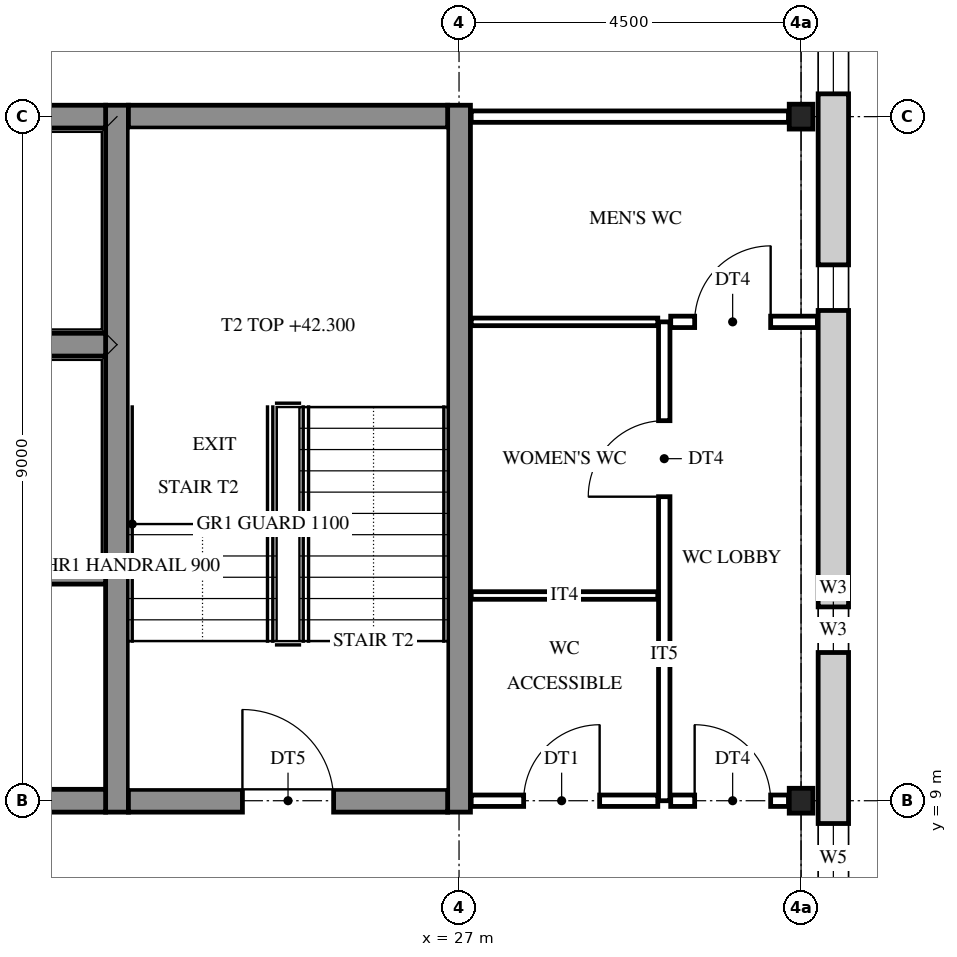
"""IFC4 building model, lengths in metres.
Left out: names, types, materials, properties, quantities, classifications, styles, units other than length and angle.
Written with IfcOpenShell. Run it as: python <this file> out.ifc"""

import sys

from ifc_helpers import new_model, si_unit, direction, frame, frame_2d, origin, origin_2d, place, context, subcontext, project, spatial, rectangle, i_section, extrude, element, fill, save


model = new_model("IFC4")
c1 = context("Model", 3, precision=1e-05, world=origin(), true_north=direction((0.0, 1.0)))
c2 = subcontext(c1, "Body", "Model", "MODEL_VIEW")
j1 = project(units=[si_unit("LENGTHUNIT", "METRE"), si_unit("PLANEANGLEUNIT", "RADIAN")], contexts=[c1])
p1 = place(None, origin())
s1 = spatial("IfcSite", under=j1, at=p1, CompositionType="ELEMENT")
p2 = place(p1, origin())
s2 = spatial("IfcBuilding", under=s1, at=p2, CompositionType="ELEMENT")
p3 = place(p2, frame((0.0, 0.0, 40.2)))
s3 = spatial("IfcBuildingStorey", under=s2, at=p3, CompositionType="ELEMENT", Elevation=40.2)
for number, where, z_axis, x_axis in (
    (1, (31.5, 9.0, 0.0), (0.0, 0.0, 1.0), (1.0, 0.0, 0.0)),
    (2, (31.5, 18.0, 0.0), (0.0, 0.0, 1.0), (1.0, 0.0, 0.0)),
):
    element("IfcColumn", number, at=place(p3, frame(where, z_axis=z_axis, x_axis=x_axis)), inside=s3, PredefinedType="COLUMN", context=c2, shape_type="SweptSolid", body=[
        extrude(i_section(OverallWidth=0.311, OverallDepth=0.327, WebThickness=0.016, FlangeThickness=0.025, FilletRadius=0.017, at=origin_2d()), origin(), (0.0, 0.0, 1.0), 4.2),
    ])
for number, where, z_axis, x_axis in (
    (3, (22.5, 8.85, 0.0), (0.0, 0.0, 1.0), (0.0, 1.0, 0.0)),
    (4, (27.0, 8.85, 0.0), (0.0, 0.0, 1.0), (0.0, 1.0, 0.0)),
):
    element("IfcWall", number, at=place(p3, frame(where, z_axis=z_axis, x_axis=x_axis)), inside=s3, PredefinedType="SHEAR", context=c2, shape_type="SweptSolid", body=[
        extrude(rectangle(XDim=9.3, YDim=0.3, at=frame_2d((4.65, 0.0))), origin(), (0.0, 0.0, 1.0), 4.2),
    ])
p4 = place(p3, frame((19.65, 9.0, 0.0), z_axis=(0.0, 0.0, 1.0), x_axis=(1.0, 0.0, 0.0)))
e5 = element("IfcWall", 5, at=p4, inside=s3, PredefinedType="SHEAR", context=c2, shape_type="SweptSolid", body=[
    extrude(rectangle(XDim=2.7, YDim=0.3, at=frame_2d((1.35, 0.0))), origin(), (0.0, 0.0, 1.0), 4.2),
])
p5 = place(p3, frame((22.65, 9.0, 0.0), z_axis=(0.0, 0.0, 1.0), x_axis=(1.0, 0.0, 0.0)))
e6 = element("IfcWall", 6, at=p5, inside=s3, PredefinedType="SHEAR", context=c2, shape_type="SweptSolid", body=[
    extrude(rectangle(XDim=4.2, YDim=0.3, at=frame_2d((2.1, 0.0))), origin(), (0.0, 0.0, 1.0), 4.2),
])
p6 = place(p5, frame((1.5, 0.0, 0.0)))
e7 = element("IfcOpeningElement", 7, at=p6, cuts=e6, PredefinedType="OPENING", context=c2, shape_type="SweptSolid", body=[
    extrude(rectangle(XDim=1.2, YDim=2.1, at=frame_2d((0.6, 1.05))), frame((0.0, 0.16, 0.0), z_axis=(0.0, -1.0, 0.0), x_axis=(1.0, 0.0, 0.0)), (0.0, 0.0, 1.0), 0.32),
])
for number, where, z_axis, x_axis in (
    (8, (19.65, 12.0, 0.0), (0.0, 0.0, 1.0), (1.0, 0.0, 0.0)),
    (9, (19.65, 15.0, 0.0), (0.0, 0.0, 1.0), (1.0, 0.0, 0.0)),
    (10, (19.65, 18.0, 0.0), (0.0, 0.0, 1.0), (1.0, 0.0, 0.0)),
):
    element("IfcWall", number, at=place(p3, frame(where, z_axis=z_axis, x_axis=x_axis)), inside=s3, PredefinedType="SHEAR", context=c2, shape_type="SweptSolid", body=[
        extrude(rectangle(XDim=2.7, YDim=0.3, at=frame_2d((1.35, 0.0))), origin(), (0.0, 0.0, 1.0), 4.2),
    ])
p7 = place(p3, frame((22.65, 18.0, 0.0), z_axis=(0.0, 0.0, 1.0), x_axis=(1.0, 0.0, 0.0)))
e11 = element("IfcWall", 11, at=p7, inside=s3, PredefinedType="SHEAR", context=c2, shape_type="SweptSolid", body=[
    extrude(rectangle(XDim=4.2, YDim=0.3, at=frame_2d((2.1, 0.0))), origin(), (0.0, 0.0, 1.0), 4.2),
])
p8 = place(p3, frame((31.925, 27.225, 0.0), z_axis=(0.0, 0.0, 1.0), x_axis=(0.0, -1.0, 0.0)))
e12 = element("IfcWall", 12, at=p8, inside=s3, PredefinedType="STANDARD", context=c2, shape_type="SweptSolid", body=[
    extrude(rectangle(XDim=27.45, YDim=0.4, at=frame_2d((13.725, 0.0))), origin(), (0.0, 0.0, 1.0), 4.2),
])
p9 = place(p8, frame((26.025, 0.0, 0.9)))
e13 = element("IfcOpeningElement", 13, at=p9, cuts=e12, PredefinedType="OPENING", context=c2, shape_type="SweptSolid", body=[
    extrude(rectangle(XDim=0.9, YDim=2.0, at=frame_2d((0.45, 1.0))), frame((0.0, 0.21, 0.0), z_axis=(0.0, -1.0, 0.0), x_axis=(1.0, 0.0, 0.0)), (0.0, 0.0, 1.0), 0.42),
])
p10 = place(p8, frame((18.525, 0.0, 0.9)))
e14 = element("IfcOpeningElement", 14, at=p10, cuts=e12, PredefinedType="OPENING", context=c2, shape_type="SweptSolid", body=[
    extrude(rectangle(XDim=0.9, YDim=2.0, at=frame_2d((0.45, 1.0))), frame((0.0, 0.21, 0.0), z_axis=(0.0, -1.0, 0.0), x_axis=(1.0, 0.0, 0.0)), (0.0, 0.0, 1.0), 0.42),
])
p11 = place(p8, frame((15.675, 0.0, 1.6)))
e15 = element("IfcOpeningElement", 15, at=p11, cuts=e12, PredefinedType="OPENING", context=c2, shape_type="SweptSolid", body=[
    extrude(rectangle(XDim=0.6, YDim=0.9, at=frame_2d((0.3, 0.45))), frame((0.0, 0.21, 0.0), z_axis=(0.0, -1.0, 0.0), x_axis=(1.0, 0.0, 0.0)), (0.0, 0.0, 1.0), 0.42),
])
p12 = place(p8, frame((11.175, 0.0, 1.6)))
e16 = element("IfcOpeningElement", 16, at=p12, cuts=e12, PredefinedType="OPENING", context=c2, shape_type="SweptSolid", body=[
    extrude(rectangle(XDim=0.6, YDim=0.9, at=frame_2d((0.3, 0.45))), frame((0.0, 0.21, 0.0), z_axis=(0.0, -1.0, 0.0), x_axis=(1.0, 0.0, 0.0)), (0.0, 0.0, 1.0), 0.42),
])
p13 = place(p8, frame((8.025, 0.0, 0.9)))
e17 = element("IfcOpeningElement", 17, at=p13, cuts=e12, PredefinedType="OPENING", context=c2, shape_type="SweptSolid", body=[
    extrude(rectangle(XDim=0.9, YDim=2.0, at=frame_2d((0.45, 1.0))), frame((0.0, 0.21, 0.0), z_axis=(0.0, -1.0, 0.0), x_axis=(1.0, 0.0, 0.0)), (0.0, 0.0, 1.0), 0.42),
])
p14 = place(p8, frame((0.525, 0.0, 0.9)))
e18 = element("IfcOpeningElement", 18, at=p14, cuts=e12, PredefinedType="OPENING", context=c2, shape_type="SweptSolid", body=[
    extrude(rectangle(XDim=0.9, YDim=2.0, at=frame_2d((0.45, 1.0))), frame((0.0, 0.21, 0.0), z_axis=(0.0, -1.0, 0.0), x_axis=(1.0, 0.0, 0.0)), (0.0, 0.0, 1.0), 0.42),
])
p15 = place(p3, frame((29.7, 9.0, 0.0), z_axis=(0.0, 0.0, 1.0), x_axis=(0.0, 1.0, 0.0)))
e19 = element("IfcWall", 19, at=p15, inside=s3, PredefinedType="PARTITIONING", context=c2, shape_type="SweptSolid", body=[
    extrude(rectangle(XDim=6.3, YDim=0.15, at=frame_2d((3.15, 0.0))), origin(), (0.0, 0.0, 1.0), 3.537),
])
p16 = place(p15, frame((4.0, 0.0, 0.0)))
e20 = element("IfcOpeningElement", 20, at=p16, cuts=e19, PredefinedType="OPENING", context=c2, shape_type="SweptSolid", body=[
    extrude(rectangle(XDim=1.0, YDim=2.1, at=frame_2d((0.5, 1.05))), frame((0.0, 0.085, 0.0), z_axis=(0.0, -1.0, 0.0), x_axis=(1.0, 0.0, 0.0)), (0.0, 0.0, 1.0), 0.17),
])
p17 = place(p3, frame((27.16, 9.0, 0.0), z_axis=(0.0, 0.0, 1.0), x_axis=(1.0, 0.0, 0.0)))
e21 = element("IfcWall", 21, at=p17, inside=s3, PredefinedType="PARTITIONING", context=c2, shape_type="SweptSolid", body=[
    extrude(rectangle(XDim=2.455, YDim=0.15, at=frame_2d((1.228, 0.0))), origin(), (0.0, 0.0, 1.0), 3.537),
])
p18 = place(p17, frame((0.69, 0.0, 0.0)))
e22 = element("IfcOpeningElement", 22, at=p18, cuts=e21, PredefinedType="OPENING", context=c2, shape_type="SweptSolid", body=[
    extrude(rectangle(XDim=1.0, YDim=2.1, at=frame_2d((0.5, 1.05))), frame((0.0, 0.085, 0.0), z_axis=(0.0, -1.0, 0.0), x_axis=(1.0, 0.0, 0.0)), (0.0, 0.0, 1.0), 0.17),
])
p19 = place(p3, frame((29.785, 9.0, 0.0), z_axis=(0.0, 0.0, 1.0), x_axis=(1.0, 0.0, 0.0)))
e23 = element("IfcWall", 23, at=p19, inside=s3, PredefinedType="PARTITIONING", context=c2, shape_type="SweptSolid", body=[
    extrude(rectangle(XDim=1.55, YDim=0.15, at=frame_2d((0.775, 0.0))), origin(), (0.0, 0.0, 1.0), 3.537),
])
p20 = place(p19, frame((0.315, 0.0, 0.0)))
e24 = element("IfcOpeningElement", 24, at=p20, cuts=e23, PredefinedType="OPENING", context=c2, shape_type="SweptSolid", body=[
    extrude(rectangle(XDim=1.0, YDim=2.1, at=frame_2d((0.5, 1.05))), frame((0.0, 0.085, 0.0), z_axis=(0.0, -1.0, 0.0), x_axis=(1.0, 0.0, 0.0)), (0.0, 0.0, 1.0), 0.17),
])
for number, where, z_axis, x_axis in (
    (25, (27.16, 11.7, 0.0), (0.0, 0.0, 1.0), (1.0, 0.0, 0.0)),
    (26, (27.16, 15.3, 0.0), (0.0, 0.0, 1.0), (1.0, 0.0, 0.0)),
):
    element("IfcWall", number, at=place(p3, frame(where, z_axis=z_axis, x_axis=x_axis)), inside=s3, PredefinedType="PARTITIONING", context=c2, shape_type="SweptSolid", body=[
        extrude(rectangle(XDim=2.455, YDim=0.1, at=frame_2d((1.228, 0.0))), origin(), (0.0, 0.0, 1.0), 3.537),
    ])
p21 = place(p3, frame((29.785, 15.3, 0.0), z_axis=(0.0, 0.0, 1.0), x_axis=(1.0, 0.0, 0.0)))
e27 = element("IfcWall", 27, at=p21, inside=s3, PredefinedType="PARTITIONING", context=c2, shape_type="SweptSolid", body=[
    extrude(rectangle(XDim=1.93, YDim=0.15, at=frame_2d((0.965, 0.0))), origin(), (0.0, 0.0, 1.0), 3.537),
])
p22 = place(p21, frame((0.315, 0.0, 0.0)))
e28 = element("IfcOpeningElement", 28, at=p22, cuts=e27, PredefinedType="OPENING", context=c2, shape_type="SweptSolid", body=[
    extrude(rectangle(XDim=1.0, YDim=2.1, at=frame_2d((0.5, 1.05))), frame((0.0, 0.085, 0.0), z_axis=(0.0, -1.0, 0.0), x_axis=(1.0, 0.0, 0.0)), (0.0, 0.0, 1.0), 0.17),
])
p23 = place(p3, frame((27.16, 18.0, 0.0), z_axis=(0.0, 0.0, 1.0), x_axis=(1.0, 0.0, 0.0)))
e29 = element("IfcWall", 29, at=p23, inside=s3, PredefinedType="PARTITIONING", context=c2, shape_type="SweptSolid", body=[
    extrude(rectangle(XDim=4.175, YDim=0.15, at=frame_2d((2.087, 0.0))), origin(), (0.0, 0.0, 1.0), 3.537),
])
p24 = place(p10, origin())
e30 = element("IfcWindow", 30, at=p24, inside=s3, PartitioningType="SINGLE_PANEL", PredefinedType="WINDOW", context=c2, shape_type="SweptSolid", body=[
    extrude(rectangle(XDim=0.9, YDim=2.0, at=frame_2d((0.45, 1.0))), frame((0.0, 0.03, 0.0), z_axis=(0.0, -1.0, 0.0), x_axis=(1.0, 0.0, 0.0)), (0.0, 0.0, 1.0), 0.06),
])
fill(e14, e30)
p25 = place(p11, origin())
e31 = element("IfcWindow", 31, at=p25, inside=s3, PartitioningType="SINGLE_PANEL", PredefinedType="WINDOW", context=c2, shape_type="SweptSolid", body=[
    extrude(rectangle(XDim=0.6, YDim=0.9, at=frame_2d((0.3, 0.45))), frame((0.0, 0.03, 0.0), z_axis=(0.0, -1.0, 0.0), x_axis=(1.0, 0.0, 0.0)), (0.0, 0.0, 1.0), 0.06),
])
fill(e15, e31)
p26 = place(p12, origin())
e32 = element("IfcWindow", 32, at=p26, inside=s3, PartitioningType="SINGLE_PANEL", PredefinedType="WINDOW", context=c2, shape_type="SweptSolid", body=[
    extrude(rectangle(XDim=0.6, YDim=0.9, at=frame_2d((0.3, 0.45))), frame((0.0, 0.03, 0.0), z_axis=(0.0, -1.0, 0.0), x_axis=(1.0, 0.0, 0.0)), (0.0, 0.0, 1.0), 0.06),
])
fill(e16, e32)
p27 = place(p13, origin())
e33 = element("IfcWindow", 33, at=p27, inside=s3, PartitioningType="SINGLE_PANEL", PredefinedType="WINDOW", context=c2, shape_type="SweptSolid", body=[
    extrude(rectangle(XDim=0.9, YDim=2.0, at=frame_2d((0.45, 1.0))), frame((0.0, 0.03, 0.0), z_axis=(0.0, -1.0, 0.0), x_axis=(1.0, 0.0, 0.0)), (0.0, 0.0, 1.0), 0.06),
])
fill(e17, e33)
p28 = place(p6, origin())
e34 = element("IfcDoor", 34, at=p28, inside=s3, OperationType="SINGLE_SWING_LEFT", PredefinedType="DOOR", context=c2, shape_type="SweptSolid", body=[
    extrude(rectangle(XDim=1.2, YDim=2.1, at=frame_2d((0.6, 1.05))), frame((0.0, 0.025, 0.0), z_axis=(0.0, -1.0, 0.0), x_axis=(1.0, 0.0, 0.0)), (0.0, 0.0, 1.0), 0.05),
])
fill(e7, e34)
p29 = place(p18, origin())
e35 = element("IfcDoor", 35, at=p29, inside=s3, OperationType="SINGLE_SWING_RIGHT", PredefinedType="DOOR", context=c2, shape_type="SweptSolid", body=[
    extrude(rectangle(XDim=1.0, YDim=2.1, at=frame_2d((0.5, 1.05))), frame((0.0, 0.025, 0.0), z_axis=(0.0, -1.0, 0.0), x_axis=(1.0, 0.0, 0.0)), (0.0, 0.0, 1.0), 0.05),
])
fill(e22, e35)
p30 = place(p16, origin())
e36 = element("IfcDoor", 36, at=p30, inside=s3, OperationType="SINGLE_SWING_LEFT", PredefinedType="DOOR", context=c2, shape_type="SweptSolid", body=[
    extrude(rectangle(XDim=1.0, YDim=2.1, at=frame_2d((0.5, 1.05))), frame((0.0, 0.025, 0.0), z_axis=(0.0, -1.0, 0.0), x_axis=(1.0, 0.0, 0.0)), (0.0, 0.0, 1.0), 0.05),
])
fill(e20, e36)
p31 = place(p22, origin())
e37 = element("IfcDoor", 37, at=p31, inside=s3, OperationType="SINGLE_SWING_RIGHT", PredefinedType="DOOR", context=c2, shape_type="SweptSolid", body=[
    extrude(rectangle(XDim=1.0, YDim=2.1, at=frame_2d((0.5, 1.05))), frame((0.0, 0.025, 0.0), z_axis=(0.0, -1.0, 0.0), x_axis=(1.0, 0.0, 0.0)), (0.0, 0.0, 1.0), 0.05),
])
fill(e28, e37)
p32 = place(p20, origin())
e38 = element("IfcDoor", 38, at=p32, inside=s3, OperationType="SINGLE_SWING_LEFT", PredefinedType="DOOR", context=c2, shape_type="SweptSolid", body=[
    extrude(rectangle(XDim=1.0, YDim=2.1, at=frame_2d((0.5, 1.05))), frame((0.0, 0.025, 0.0), z_axis=(0.0, -1.0, 0.0), x_axis=(1.0, 0.0, 0.0)), (0.0, 0.0, 1.0), 0.05),
])
fill(e24, e38)
save(model, sys.argv[1])
